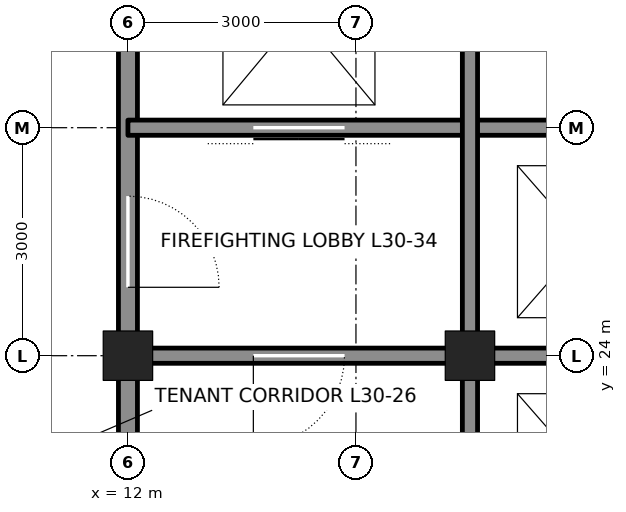
"""IFC4 building model, lengths in metres.
Left out: names, types, materials, properties, quantities, classifications, styles, units other than length and angle.
Written with IfcOpenShell. Run it as: python <this file> out.ifc"""

import sys

from ifc_helpers import new_model, si_unit, direction, frame, frame_2d, origin, origin_2d, place, context, subcontext, project, spatial, rectangle, hollow_rectangle, extrude, element, fill, save


model = new_model("IFC4")
c1 = context("Model", 3, precision=1e-05, world=origin(), true_north=direction((0.0, 1.0)))
c2 = subcontext(c1, "Body", "Model", "MODEL_VIEW")
j1 = project(units=[si_unit("LENGTHUNIT", "METRE"), si_unit("PLANEANGLEUNIT", "RADIAN")], contexts=[c1])
p1 = place(None, origin())
s1 = spatial("IfcSite", under=j1, at=p1, CompositionType="ELEMENT")
p2 = place(p1, origin())
s2 = spatial("IfcBuilding", under=s1, at=p2, CompositionType="ELEMENT")
p3 = place(p2, frame((0.0, 0.0, 140.4)))
s3 = spatial("IfcBuildingStorey", under=s2, at=p3, CompositionType="ELEMENT", Elevation=140.4)
for number, where, z_axis, x_axis in (
    (1, (12.0, 24.0, 0.0), (0.0, 0.0, 1.0), (1.0, 0.0, 0.0)),
    (2, (16.5, 24.0, 0.0), (0.0, 0.0, 1.0), (1.0, 0.0, 0.0)),
):
    element("IfcColumn", number, at=place(p3, frame(where, z_axis=z_axis, x_axis=x_axis)), inside=s3, PredefinedType="COLUMN", context=c2, shape_type="SweptSolid", body=[
        extrude(hollow_rectangle(XDim=0.65, YDim=0.65, WallThickness=0.065, at=origin_2d()), origin(), (0.0, 0.0, 1.0), 4.2),
    ])
p4 = place(p3, frame((12.0, 21.25, 0.0), z_axis=(0.0, 0.0, 1.0), x_axis=(0.0, 1.0, 0.0)))
e3 = element("IfcWall", 3, at=p4, inside=s3, PredefinedType="SOLIDWALL", context=c2, shape_type="SweptSolid", body=[
    extrude(rectangle(XDim=2.5, YDim=0.25, at=frame_2d((1.25, 0.0))), origin(), (0.0, 0.0, 1.0), 3.113),
])
p5 = place(p3, frame((12.0, 24.25, 0.0), z_axis=(0.0, 0.0, 1.0), x_axis=(0.0, 1.0, 0.0)))
e4 = element("IfcWall", 4, at=p5, inside=s3, PredefinedType="SOLIDWALL", context=c2, shape_type="SweptSolid", body=[
    extrude(rectangle(XDim=8.5, YDim=0.25, at=frame_2d((4.25, 0.0))), origin(), (0.0, 0.0, 1.0), 3.113),
])
p6 = place(p5, frame((0.65, 0.0, 0.0)))
e5 = element("IfcOpeningElement", 5, at=p6, cuts=e4, PredefinedType="OPENING", context=c2, shape_type="SweptSolid", body=[
    extrude(rectangle(XDim=1.2, YDim=2.1, at=frame_2d((0.6, 1.05))), frame((0.0, 0.135, 0.0), z_axis=(0.0, -1.0, 0.0), x_axis=(1.0, 0.0, 0.0)), (0.0, 0.0, 1.0), 0.27),
])
p7 = place(p5, frame((6.875, 0.0, 0.0)))
e6 = element("IfcOpeningElement", 6, at=p7, cuts=e4, PredefinedType="OPENING", context=c2, shape_type="SweptSolid", body=[
    extrude(rectangle(XDim=0.75, YDim=2.1, at=frame_2d((0.375, 1.05))), frame((0.0, 0.135, 0.0), z_axis=(0.0, -1.0, 0.0), x_axis=(1.0, 0.0, 0.0)), (0.0, 0.0, 1.0), 0.27),
])
p8 = place(p3, frame((12.25, 24.0, 0.0), z_axis=(0.0, 0.0, 1.0), x_axis=(1.0, 0.0, 0.0)))
e7 = element("IfcWall", 7, at=p8, inside=s3, PredefinedType="SOLIDWALL", context=c2, shape_type="SweptSolid", body=[
    extrude(rectangle(XDim=4.0, YDim=0.2, at=frame_2d((2.0, 0.0))), origin(), (0.0, 0.0, 1.0), 3.09),
])
p9 = place(p8, frame((1.4, 0.0, 0.0)))
e8 = element("IfcOpeningElement", 8, at=p9, cuts=e7, PredefinedType="OPENING", context=c2, shape_type="SweptSolid", body=[
    extrude(rectangle(XDim=1.2, YDim=2.1, at=frame_2d((0.6, 1.05))), frame((0.0, 0.11, 0.0), z_axis=(0.0, -1.0, 0.0), x_axis=(1.0, 0.0, 0.0)), (0.0, 0.0, 1.0), 0.22),
])
p10 = place(p3, frame((16.75, 24.0, 0.0), z_axis=(0.0, 0.0, 1.0), x_axis=(1.0, 0.0, 0.0)))
e9 = element("IfcWall", 9, at=p10, inside=s3, PredefinedType="SOLIDWALL", context=c2, shape_type="SweptSolid", body=[
    extrude(rectangle(XDim=2.75, YDim=0.2, at=frame_2d((1.375, 0.0))), origin(), (0.0, 0.0, 1.0), 3.09),
])
p11 = place(p3, frame((12.0, 27.0, 0.0), z_axis=(0.0, 0.0, 1.0), x_axis=(1.0, 0.0, 0.0)))
e10 = element("IfcWall", 10, at=p11, inside=s3, PredefinedType="SOLIDWALL", context=c2, shape_type="SweptSolid", body=[
    extrude(rectangle(XDim=7.5, YDim=0.2, at=frame_2d((3.75, 0.0))), origin(), (0.0, 0.0, 1.0), 4.04),
])
p12 = place(p11, frame((1.65, 0.0, 0.0)))
e11 = element("IfcOpeningElement", 11, at=p12, cuts=e10, PredefinedType="OPENING", context=c2, shape_type="SweptSolid", body=[
    extrude(rectangle(XDim=1.2, YDim=2.1, at=frame_2d((0.6, 1.05))), frame((0.0, 0.11, 0.0), z_axis=(0.0, -1.0, 0.0), x_axis=(1.0, 0.0, 0.0)), (0.0, 0.0, 1.0), 0.22),
])
p13 = place(p3, frame((16.5, 21.25, 0.0), z_axis=(0.0, 0.0, 1.0), x_axis=(0.0, 1.0, 0.0)))
e12 = element("IfcWall", 12, at=p13, inside=s3, PredefinedType="SOLIDWALL", context=c2, shape_type="SweptSolid", body=[
    extrude(rectangle(XDim=2.5, YDim=0.2, at=frame_2d((1.25, 0.0))), origin(), (0.0, 0.0, 1.0), 3.113),
])
p14 = place(p3, frame((16.5, 24.25, 0.0), z_axis=(0.0, 0.0, 1.0), x_axis=(0.0, 1.0, 0.0)))
e13 = element("IfcWall", 13, at=p14, inside=s3, PredefinedType="SOLIDWALL", context=c2, shape_type="SweptSolid", body=[
    extrude(rectangle(XDim=8.5, YDim=0.2, at=frame_2d((4.25, 0.0))), origin(), (0.0, 0.0, 1.0), 3.113),
])
p15 = place(p9, frame((1.2, 0.0, 0.0), z_axis=(0.0, 0.0, 1.0), x_axis=(-1.0, 0.0, 0.0)))
e14 = element("IfcDoor", 14, at=p15, inside=s3, OperationType="SINGLE_SWING_RIGHT", PredefinedType="DOOR", context=c2, shape_type="SweptSolid", body=[
    extrude(rectangle(XDim=1.2, YDim=2.1, at=frame_2d((0.6, 1.05))), frame((0.0, 0.025, 0.0), z_axis=(0.0, -1.0, 0.0), x_axis=(1.0, 0.0, 0.0)), (0.0, 0.0, 1.0), 0.05),
])
fill(e8, e14)
p16 = place(p6, frame((1.2, 0.0, 0.0), z_axis=(0.0, 0.0, 1.0), x_axis=(-1.0, 0.0, 0.0)))
e15 = element("IfcDoor", 15, at=p16, inside=s3, OperationType="SINGLE_SWING_RIGHT", PredefinedType="DOOR", context=c2, shape_type="SweptSolid", body=[
    extrude(rectangle(XDim=1.2, YDim=2.1, at=frame_2d((0.6, 1.05))), frame((0.0, 0.025, 0.0), z_axis=(0.0, -1.0, 0.0), x_axis=(1.0, 0.0, 0.0)), (0.0, 0.0, 1.0), 0.05),
])
fill(e5, e15)
p17 = place(p12, origin())
e16 = element("IfcDoor", 16, at=p17, inside=s3, OperationType="DOUBLE_DOOR_SLIDING", PredefinedType="DOOR", context=c2, shape_type="SweptSolid", body=[
    extrude(rectangle(XDim=1.2, YDim=2.1, at=frame_2d((0.6, 1.05))), frame((0.0, 0.025, 0.0), z_axis=(0.0, -1.0, 0.0), x_axis=(1.0, 0.0, 0.0)), (0.0, 0.0, 1.0), 0.05),
])
fill(e11, e16)
save(model, sys.argv[1])
